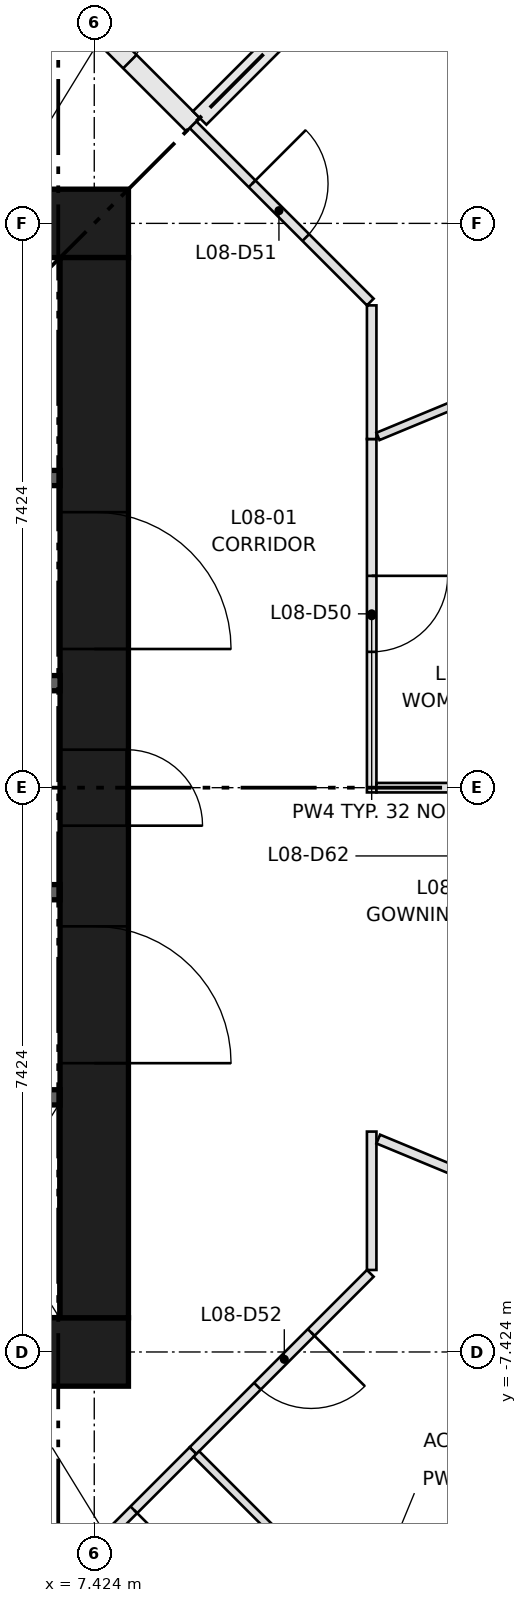
"""IFC4 building model, lengths in metres.
Left out: names, types, materials, properties, quantities, classifications, styles, units other than length and angle.
Written with IfcOpenShell. Run it as: python <this file> out.ifc"""

import sys

from ifc_helpers import new_model, si_unit, direction, frame, frame_2d, origin, place, context, subcontext, project, spatial, rectangle, extrude, element, fill, save


model = new_model("IFC4")
c1 = context("Model", 3, precision=1e-05, world=origin(), true_north=direction((0.0, 1.0)))
c2 = subcontext(c1, "Body", "Model", "MODEL_VIEW")
j1 = project(units=[si_unit("LENGTHUNIT", "METRE"), si_unit("PLANEANGLEUNIT", "RADIAN")], contexts=[c1])
p1 = place(None, origin())
s1 = spatial("IfcSite", under=j1, at=p1, CompositionType="ELEMENT")
p2 = place(p1, origin())
s2 = spatial("IfcBuilding", under=s1, at=p2, CompositionType="ELEMENT")
p3 = place(p2, frame((0.0, 0.0, 33.5)))
s3 = spatial("IfcBuildingStorey", under=s2, at=p3, CompositionType="ELEMENT", Elevation=33.5)
for number, where, z_axis, x_axis in (
    (1, (-7.874, -7.424, 0.0), (0.0, 0.0, 1.0), (1.0, 0.0, 0.0)),
    (2, (-7.874, 7.424, 0.0), (0.0, 0.0, 1.0), (1.0, 0.0, 0.0)),
):
    element("IfcWall", number, at=place(p3, frame(where, z_axis=z_axis, x_axis=x_axis)), inside=s3, PredefinedType="SHEAR", context=c2, shape_type="SweptSolid", body=[
        extrude(rectangle(XDim=15.748, YDim=0.9, at=frame_2d((7.874, 0.0))), origin(), (0.0, 0.0, 1.0), 3.65),
    ])
p4 = place(p3, frame((7.424, -6.974, 0.0), z_axis=(0.0, 0.0, 1.0), x_axis=(0.0, 1.0, 0.0)))
e3 = element("IfcWall", 3, at=p4, inside=s3, PredefinedType="SHEAR", context=c2, shape_type="SweptSolid", body=[
    extrude(rectangle(XDim=13.948, YDim=0.9, at=frame_2d((6.974, 0.0))), origin(), (0.0, 0.0, 1.0), 3.65),
])
p5 = place(p4, frame((6.474, 0.0, 0.0)))
e4 = element("IfcOpeningElement", 4, at=p5, cuts=e3, PredefinedType="OPENING", context=c2, shape_type="SweptSolid", body=[
    extrude(rectangle(XDim=1.0, YDim=2.1, at=frame_2d((0.5, 1.05))), frame((0.0, 0.46, 0.0), z_axis=(0.0, -1.0, 0.0), x_axis=(1.0, 0.0, 0.0)), (0.0, 0.0, 1.0), 0.92),
])
p6 = place(p4, frame((3.35, 0.0, 0.0)))
e5 = element("IfcOpeningElement", 5, at=p6, cuts=e3, PredefinedType="OPENING", context=c2, shape_type="SweptSolid", body=[
    extrude(rectangle(XDim=1.8, YDim=2.1, at=frame_2d((0.9, 1.05))), frame((0.0, 0.46, 0.0), z_axis=(0.0, -1.0, 0.0), x_axis=(1.0, 0.0, 0.0)), (0.0, 0.0, 1.0), 0.92),
])
p7 = place(p4, frame((8.799, 0.0, 0.0)))
e6 = element("IfcOpeningElement", 6, at=p7, cuts=e3, PredefinedType="OPENING", context=c2, shape_type="SweptSolid", body=[
    extrude(rectangle(XDim=1.8, YDim=2.1, at=frame_2d((0.9, 1.05))), frame((0.0, 0.46, 0.0), z_axis=(0.0, -1.0, 0.0), x_axis=(1.0, 0.0, 0.0)), (0.0, 0.0, 1.0), 0.92),
])
p8 = place(p3, frame((-6.974, -4.074, 0.0), z_axis=(0.0, 0.0, 1.0), x_axis=(1.0, 0.0, 0.0)))
e7 = element("IfcWall", 7, at=p8, inside=s3, PredefinedType="SHEAR", context=c2, shape_type="SweptSolid", body=[
    extrude(rectangle(XDim=13.948, YDim=0.2, at=frame_2d((6.974, 0.0))), origin(), (0.0, 0.0, 1.0), 3.3),
])
p9 = place(p8, frame((0.918, 0.0, 0.0)))
e8 = element("IfcOpeningElement", 8, at=p9, cuts=e7, PredefinedType="OPENING", context=c2, shape_type="SweptSolid", body=[
    extrude(rectangle(XDim=1.1, YDim=2.1, at=frame_2d((0.55, 1.05))), frame((0.0, 0.11, 0.0), z_axis=(0.0, -1.0, 0.0), x_axis=(1.0, 0.0, 0.0)), (0.0, 0.0, 1.0), 0.22),
])
p10 = place(p8, frame((4.055, 0.0, 0.0)))
e9 = element("IfcOpeningElement", 9, at=p10, cuts=e7, PredefinedType="OPENING", context=c2, shape_type="SweptSolid", body=[
    extrude(rectangle(XDim=1.1, YDim=2.1, at=frame_2d((0.55, 1.05))), frame((0.0, 0.11, 0.0), z_axis=(0.0, -1.0, 0.0), x_axis=(1.0, 0.0, 0.0)), (0.0, 0.0, 1.0), 0.22),
])
p11 = place(p8, frame((6.658, 0.0, 0.0)))
e10 = element("IfcOpeningElement", 10, at=p11, cuts=e7, PredefinedType="OPENING", context=c2, shape_type="SweptSolid", body=[
    extrude(rectangle(XDim=1.0, YDim=2.1, at=frame_2d((0.5, 1.05))), frame((0.0, 0.11, 0.0), z_axis=(0.0, -1.0, 0.0), x_axis=(1.0, 0.0, 0.0)), (0.0, 0.0, 1.0), 0.22),
])
p12 = place(p8, frame((8.627, 0.0, 0.0)))
e11 = element("IfcOpeningElement", 11, at=p12, cuts=e7, PredefinedType="OPENING", context=c2, shape_type="SweptSolid", body=[
    extrude(rectangle(XDim=1.0, YDim=2.1, at=frame_2d((0.5, 1.05))), frame((0.0, 0.11, 0.0), z_axis=(0.0, -1.0, 0.0), x_axis=(1.0, 0.0, 0.0)), (0.0, 0.0, 1.0), 0.22),
])
p13 = place(p8, frame((10.595, 0.0, 0.0)))
e12 = element("IfcOpeningElement", 12, at=p13, cuts=e7, PredefinedType="OPENING", context=c2, shape_type="SweptSolid", body=[
    extrude(rectangle(XDim=1.0, YDim=2.1, at=frame_2d((0.5, 1.05))), frame((0.0, 0.11, 0.0), z_axis=(0.0, -1.0, 0.0), x_axis=(1.0, 0.0, 0.0)), (0.0, 0.0, 1.0), 0.22),
])
p14 = place(p8, frame((12.564, 0.0, 0.0)))
e13 = element("IfcOpeningElement", 13, at=p14, cuts=e7, PredefinedType="OPENING", context=c2, shape_type="SweptSolid", body=[
    extrude(rectangle(XDim=1.0, YDim=2.1, at=frame_2d((0.5, 1.05))), frame((0.0, 0.11, 0.0), z_axis=(0.0, -1.0, 0.0), x_axis=(1.0, 0.0, 0.0)), (0.0, 0.0, 1.0), 0.22),
])
p15 = place(p3, frame((0.0, 4.074, 0.0), z_axis=(0.0, 0.0, 1.0), x_axis=(1.0, 0.0, 0.0)))
e14 = element("IfcWall", 14, at=p15, inside=s3, PredefinedType="SHEAR", context=c2, shape_type="SweptSolid", body=[
    extrude(rectangle(XDim=6.974, YDim=0.2, at=frame_2d((3.487, 0.0))), origin(), (0.0, 0.0, 1.0), 3.3),
])
p16 = place(p15, frame((0.43, 0.0, 0.0)))
e15 = element("IfcOpeningElement", 15, at=p16, cuts=e14, PredefinedType="OPENING", context=c2, shape_type="SweptSolid", body=[
    extrude(rectangle(XDim=1.0, YDim=2.1, at=frame_2d((0.5, 1.05))), frame((0.0, 0.11, 0.0), z_axis=(0.0, -1.0, 0.0), x_axis=(1.0, 0.0, 0.0)), (0.0, 0.0, 1.0), 0.22),
])
p17 = place(p15, frame((2.153, 0.0, 0.0)))
e16 = element("IfcOpeningElement", 16, at=p17, cuts=e14, PredefinedType="OPENING", context=c2, shape_type="SweptSolid", body=[
    extrude(rectangle(XDim=1.0, YDim=2.1, at=frame_2d((0.5, 1.05))), frame((0.0, 0.11, 0.0), z_axis=(0.0, -1.0, 0.0), x_axis=(1.0, 0.0, 0.0)), (0.0, 0.0, 1.0), 0.22),
])
p18 = place(p15, frame((3.875, 0.0, 0.0)))
e17 = element("IfcOpeningElement", 17, at=p18, cuts=e14, PredefinedType="OPENING", context=c2, shape_type="SweptSolid", body=[
    extrude(rectangle(XDim=1.0, YDim=2.1, at=frame_2d((0.5, 1.05))), frame((0.0, 0.11, 0.0), z_axis=(0.0, -1.0, 0.0), x_axis=(1.0, 0.0, 0.0)), (0.0, 0.0, 1.0), 0.22),
])
p19 = place(p15, frame((5.79, 0.0, 0.0)))
e18 = element("IfcOpeningElement", 18, at=p19, cuts=e14, PredefinedType="OPENING", context=c2, shape_type="SweptSolid", body=[
    extrude(rectangle(XDim=0.8, YDim=2.1, at=frame_2d((0.4, 1.05))), frame((0.0, 0.11, 0.0), z_axis=(0.0, -1.0, 0.0), x_axis=(1.0, 0.0, 0.0)), (0.0, 0.0, 1.0), 0.22),
])
for number, where, z_axis, x_axis in (
    (19, (4.374, -1.375, 0.0), (0.0, 0.0, 1.0), (1.0, 0.0, 0.0)),
    (20, (4.374, 1.375, 0.0), (0.0, 0.0, 1.0), (1.0, 0.0, 0.0)),
):
    element("IfcWall", number, at=place(p3, frame(where, z_axis=z_axis, x_axis=x_axis)), inside=s3, PredefinedType="SHEAR", context=c2, shape_type="SweptSolid", body=[
        extrude(rectangle(XDim=2.6, YDim=0.2, at=frame_2d((1.3, 0.0))), origin(), (0.0, 0.0, 1.0), 3.3),
    ])
p20 = place(p3, frame((11.074, 4.587, 0.0), z_axis=(0.0, 0.0, 1.0), x_axis=(0.0, -1.0, 0.0)))
e21 = element("IfcWall", 21, at=p20, inside=s3, PredefinedType="PARTITIONING", context=c2, shape_type="SweptSolid", body=[
    extrude(rectangle(XDim=4.649, YDim=0.125, at=frame_2d((2.325, 0.0))), origin(), (0.0, 0.0, 1.0), 3.3),
])
p21 = place(p20, frame((1.8, 0.0, 0.0)))
e22 = element("IfcOpeningElement", 22, at=p21, cuts=e21, PredefinedType="OPENING", context=c2, shape_type="SweptSolid", body=[
    extrude(rectangle(XDim=1.0, YDim=2.1, at=frame_2d((0.5, 1.05))), frame((0.0, 0.073, 0.0), z_axis=(0.0, -1.0, 0.0), x_axis=(1.0, 0.0, 0.0)), (0.0, 0.0, 1.0), 0.145),
])
p22 = place(p3, frame((8.722, 8.722, 0.0), z_axis=(0.0, 0.0, 1.0), x_axis=(0.707143776336, -0.707069784102, 0.0)))
e23 = element("IfcWall", 23, at=p22, inside=s3, PredefinedType="PARTITIONING", context=c2, shape_type="SweptSolid", body=[
    extrude(rectangle(XDim=3.3, YDim=0.125, at=frame_2d((1.65, 0.0))), origin(), (0.0, 0.0, 1.0), 3.3),
])
p23 = place(p22, frame((1.1, 0.0, 0.0)))
e24 = element("IfcOpeningElement", 24, at=p23, cuts=e23, PredefinedType="OPENING", context=c2, shape_type="SweptSolid", body=[
    extrude(rectangle(XDim=1.0, YDim=2.1, at=frame_2d((0.5, 1.05))), frame((0.0, 0.073, 0.0), z_axis=(0.0, -1.0, 0.0), x_axis=(1.0, 0.0, 0.0)), (0.0, 0.0, 1.0), 0.145),
])
p24 = place(p3, frame((11.074, 6.345, 0.0), z_axis=(0.0, 0.0, 1.0), x_axis=(0.0, -1.0, 0.0)))
e25 = element("IfcWall", 25, at=p24, inside=s3, PredefinedType="PARTITIONING", context=c2, shape_type="SweptSolid", body=[
    extrude(rectangle(XDim=1.758, YDim=0.125, at=frame_2d((0.879, 0.0))), origin(), (0.0, 0.0, 1.0), 3.3),
])
p25 = place(p3, frame((11.056, -6.389, 0.0), z_axis=(0.0, 0.0, 1.0), x_axis=(-0.707143776336, -0.707069784102, 0.0)))
e26 = element("IfcWall", 26, at=p25, inside=s3, PredefinedType="PARTITIONING", context=c2, shape_type="SweptSolid", body=[
    extrude(rectangle(XDim=3.3, YDim=0.125, at=frame_2d((1.65, 0.0))), origin(), (0.0, 0.0, 1.0), 3.3),
])
p26 = place(p25, frame((1.1, 0.0, 0.0)))
e27 = element("IfcOpeningElement", 27, at=p26, cuts=e26, PredefinedType="OPENING", context=c2, shape_type="SweptSolid", body=[
    extrude(rectangle(XDim=1.0, YDim=2.1, at=frame_2d((0.5, 1.05))), frame((0.0, 0.073, 0.0), z_axis=(0.0, -1.0, 0.0), x_axis=(1.0, 0.0, 0.0)), (0.0, 0.0, 1.0), 0.145),
])
p27 = place(p3, frame((11.074, -4.524, 0.0), z_axis=(0.0, 0.0, 1.0), x_axis=(0.0, -1.0, 0.0)))
e28 = element("IfcWall", 28, at=p27, inside=s3, PredefinedType="PARTITIONING", context=c2, shape_type="SweptSolid", body=[
    extrude(rectangle(XDim=1.821, YDim=0.125, at=frame_2d((0.91, 0.0))), origin(), (0.0, 0.0, 1.0), 3.3),
])
p28 = place(p3, frame((6.408, 11.037, 0.0), z_axis=(0.0, 0.0, 1.0), x_axis=(0.707069491442, -0.707144068965, 0.0)))
e29 = element("IfcWall", 29, at=p28, inside=s3, PredefinedType="PARTITIONING", context=c2, shape_type="SweptSolid", body=[
    extrude(rectangle(XDim=3.274, YDim=0.25, at=frame_2d((1.637, 0.0))), origin(), (0.0, 0.0, 1.0), 3.3),
])
p29 = place(p28, frame((1.1, 0.0, 0.0)))
e30 = element("IfcOpeningElement", 30, at=p29, cuts=e29, PredefinedType="OPENING", context=c2, shape_type="SweptSolid", body=[
    extrude(rectangle(XDim=1.0, YDim=2.1, at=frame_2d((0.5, 1.05))), frame((0.0, 0.135, 0.0), z_axis=(0.0, -1.0, 0.0), x_axis=(1.0, 0.0, 0.0)), (0.0, 0.0, 1.0), 0.27),
])
p30 = place(p3, frame((8.722, -8.722, 0.0), z_axis=(0.0, 0.0, 1.0), x_axis=(-0.707069784102, -0.707143776336, 0.0)))
e31 = element("IfcWall", 31, at=p30, inside=s3, PredefinedType="PARTITIONING", context=c2, shape_type="SweptSolid", body=[
    extrude(rectangle(XDim=3.3, YDim=0.125, at=frame_2d((1.65, 0.0))), origin(), (0.0, 0.0, 1.0), 3.3),
])
p31 = place(p30, frame((1.1, 0.0, 0.0)))
e32 = element("IfcOpeningElement", 32, at=p31, cuts=e31, PredefinedType="OPENING", context=c2, shape_type="SweptSolid", body=[
    extrude(rectangle(XDim=1.0, YDim=2.1, at=frame_2d((0.5, 1.05))), frame((0.0, 0.073, 0.0), z_axis=(0.0, -1.0, 0.0), x_axis=(1.0, 0.0, 0.0)), (0.0, 0.0, 1.0), 0.145),
])
p32 = place(p3, frame((11.156, 4.621, 0.0), z_axis=(0.0, 0.0, 1.0), x_axis=(0.923813438205, 0.382842959178, 0.0)))
e33 = element("IfcWall", 33, at=p32, inside=s3, PredefinedType="PARTITIONING", context=c2, shape_type="SweptSolid", body=[
    extrude(rectangle(XDim=1.624, YDim=0.105, at=frame_2d((0.812, 0.0))), origin(), (0.0, 0.0, 1.0), 3.3),
])
p33 = place(p3, frame((13.633, 0.0, 0.0), z_axis=(0.0, 0.0, 1.0), x_axis=(-1.0, 0.0, 0.0)))
e34 = element("IfcWall", 34, at=p33, inside=s3, PredefinedType="PARTITIONING", context=c2, shape_type="SweptSolid", body=[
    extrude(rectangle(XDim=2.497, YDim=0.125, at=frame_2d((1.249, 0.0))), origin(), (0.0, 0.0, 1.0), 3.3),
])
p34 = place(p3, frame((13.131, 13.131, 0.0), z_axis=(0.0, 0.0, 1.0), x_axis=(-0.707106781187, -0.707106781187, 0.0)))
e35 = element("IfcWall", 35, at=p34, inside=s3, PredefinedType="PARTITIONING", context=c2, shape_type="SweptSolid", body=[
    extrude(rectangle(XDim=6.11, YDim=0.25, at=frame_2d((3.055, 0.0))), origin(), (0.0, 0.0, 1.0), 3.3),
])
p35 = place(p3, frame((8.767, -8.767, 0.0), z_axis=(0.0, 0.0, 1.0), x_axis=(0.707106781187, -0.707106781187, 0.0)))
e36 = element("IfcWall", 36, at=p35, inside=s3, PredefinedType="PARTITIONING", context=c2, shape_type="SweptSolid", body=[
    extrude(rectangle(XDim=6.172, YDim=0.105, at=frame_2d((3.086, 0.0))), origin(), (0.0, 0.0, 1.0), 3.3),
])
p36 = place(p3, frame((11.16, -4.623, 0.0), z_axis=(0.0, 0.0, 1.0), x_axis=(0.92383312361, -0.382795454155, 0.0)))
e37 = element("IfcWall", 37, at=p36, inside=s3, PredefinedType="PARTITIONING", context=c2, shape_type="SweptSolid", body=[
    extrude(rectangle(XDim=1.62, YDim=0.125, at=frame_2d((0.81, 0.0))), origin(), (0.0, 0.0, 1.0), 3.3),
])
p37 = place(p5, frame((1.0, 0.0, 0.0), z_axis=(0.0, 0.0, 1.0), x_axis=(-1.0, 0.0, 0.0)))
e38 = element("IfcDoor", 38, at=p37, inside=s3, OperationType="SINGLE_SWING_LEFT", PredefinedType="DOOR", context=c2, shape_type="SweptSolid", body=[
    extrude(rectangle(XDim=1.0, YDim=2.1, at=frame_2d((0.5, 1.05))), frame((0.0, 0.45, 0.0), z_axis=(0.0, -1.0, 0.0), x_axis=(1.0, 0.0, 0.0)), (0.0, 0.0, 1.0), 0.05),
])
fill(e4, e38)
p38 = place(p6, frame((1.8, 0.0, 0.0), z_axis=(0.0, 0.0, 1.0), x_axis=(-1.0, 0.0, 0.0)))
e39 = element("IfcDoor", 39, at=p38, inside=s3, OperationType="DOUBLE_DOOR_SINGLE_SWING", PredefinedType="DOOR", context=c2, shape_type="SweptSolid", body=[
    extrude(rectangle(XDim=1.8, YDim=2.1, at=frame_2d((0.9, 1.05))), frame((0.0, 0.025, 0.0), z_axis=(0.0, -1.0, 0.0), x_axis=(1.0, 0.0, 0.0)), (0.0, 0.0, 1.0), 0.05),
])
fill(e5, e39)
p39 = place(p7, frame((1.8, 0.0, 0.0), z_axis=(0.0, 0.0, 1.0), x_axis=(-1.0, 0.0, 0.0)))
e40 = element("IfcDoor", 40, at=p39, inside=s3, OperationType="DOUBLE_DOOR_SINGLE_SWING", PredefinedType="DOOR", context=c2, shape_type="SweptSolid", body=[
    extrude(rectangle(XDim=1.8, YDim=2.1, at=frame_2d((0.9, 1.05))), frame((0.0, 0.025, 0.0), z_axis=(0.0, -1.0, 0.0), x_axis=(1.0, 0.0, 0.0)), (0.0, 0.0, 1.0), 0.05),
])
fill(e6, e40)
p40 = place(p21, origin())
e41 = element("IfcDoor", 41, at=p40, inside=s3, OperationType="SINGLE_SWING_LEFT", PredefinedType="DOOR", context=c2, shape_type="SweptSolid", body=[
    extrude(rectangle(XDim=1.0, YDim=2.1, at=frame_2d((0.5, 1.05))), frame((0.0, 0.025, 0.0), z_axis=(0.0, -1.0, 0.0), x_axis=(1.0, 0.0, 0.0)), (0.0, 0.0, 1.0), 0.05),
])
fill(e22, e41)
p41 = place(p23, origin())
e42 = element("IfcDoor", 42, at=p41, inside=s3, OperationType="SINGLE_SWING_LEFT", PredefinedType="DOOR", context=c2, shape_type="SweptSolid", body=[
    extrude(rectangle(XDim=1.0, YDim=2.1, at=frame_2d((0.5, 1.05))), frame((0.0, 0.025, 0.0), z_axis=(0.0, -1.0, 0.0), x_axis=(1.0, 0.0, 0.0)), (0.0, 0.0, 1.0), 0.05),
])
fill(e24, e42)
p42 = place(p26, origin())
e43 = element("IfcDoor", 43, at=p42, inside=s3, OperationType="SINGLE_SWING_LEFT", PredefinedType="DOOR", context=c2, shape_type="SweptSolid", body=[
    extrude(rectangle(XDim=1.0, YDim=2.1, at=frame_2d((0.5, 1.05))), frame((0.0, 0.025, 0.0), z_axis=(0.0, -1.0, 0.0), x_axis=(1.0, 0.0, 0.0)), (0.0, 0.0, 1.0), 0.05),
])
fill(e27, e43)
p43 = place(p29, origin())
e44 = element("IfcDoor", 44, at=p43, inside=s3, OperationType="SINGLE_SWING_LEFT", PredefinedType="DOOR", context=c2, shape_type="SweptSolid", body=[
    extrude(rectangle(XDim=1.0, YDim=2.1, at=frame_2d((0.5, 1.05))), frame((0.0, 0.025, 0.0), z_axis=(0.0, -1.0, 0.0), x_axis=(1.0, 0.0, 0.0)), (0.0, 0.0, 1.0), 0.05),
])
fill(e30, e44)
p44 = place(p31, origin())
e45 = element("IfcDoor", 45, at=p44, inside=s3, OperationType="SINGLE_SWING_LEFT", PredefinedType="DOOR", context=c2, shape_type="SweptSolid", body=[
    extrude(rectangle(XDim=1.0, YDim=2.1, at=frame_2d((0.5, 1.05))), frame((0.0, 0.025, 0.0), z_axis=(0.0, -1.0, 0.0), x_axis=(1.0, 0.0, 0.0)), (0.0, 0.0, 1.0), 0.05),
])
fill(e32, e45)
save(model, sys.argv[1])
